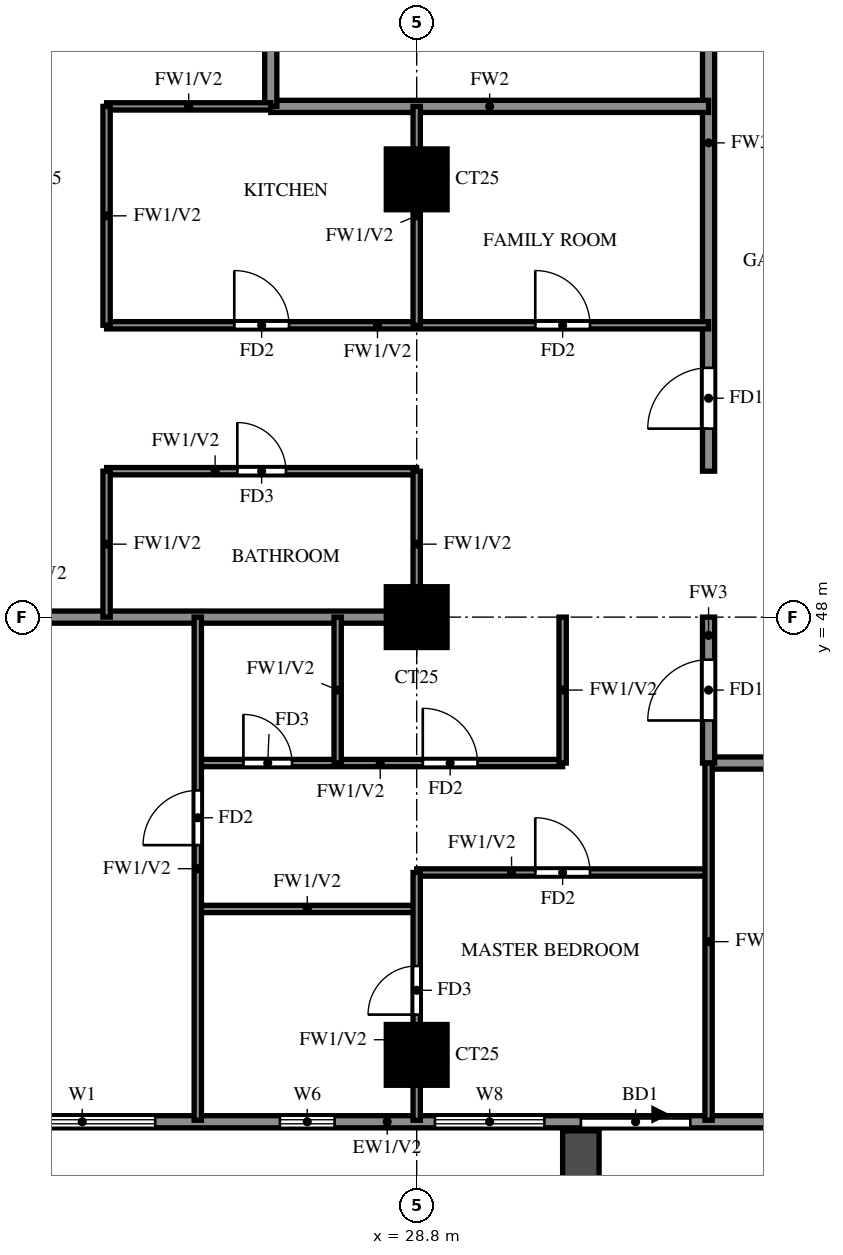
"""IFC4 building model, lengths in metres.
Left out: names, types, materials, properties, quantities, classifications, styles, units other than length and angle.
Written with IfcOpenShell. Run it as: python <this file> out.ifc"""

import sys

from ifc_helpers import new_model, si_unit, direction, frame, frame_2d, origin, origin_2d, place, context, subcontext, project, spatial, rectangle, extrude, source, transform, mapped, element, fill, save


model = new_model("IFC4")
c1 = context("Model", 3, precision=1e-05, world=origin(), true_north=direction((0.0, 1.0)))
c2 = subcontext(c1, "Body", "Model", "MODEL_VIEW")
j1 = project(units=[si_unit("LENGTHUNIT", "METRE"), si_unit("PLANEANGLEUNIT", "RADIAN")], contexts=[c1])
p1 = place(None, origin())
s1 = spatial("IfcSite", under=j1, at=p1, CompositionType="ELEMENT")
p2 = place(p1, origin())
s2 = spatial("IfcBuilding", under=s1, at=p2, CompositionType="ELEMENT")
p3 = place(p2, frame((0.0, 0.0, 153.5)))
s3 = spatial("IfcBuildingStorey", under=s2, at=p3, CompositionType="ELEMENT", Elevation=153.5)
m1 = source(origin(), c2, "Body", "SweptSolid", [
    extrude(rectangle(XDim=1.0, YDim=1.0, at=origin_2d()), origin(), (0.0, 0.0, 1.0), 3.2),
])
for number, where, z_axis, x_axis in (
    (1, (28.8, 40.8, 0.0), (0.0, 0.0, 1.0), (1.0, 0.0, 0.0)),
    (2, (28.8, 48.0, 0.0), (0.0, 0.0, 1.0), (1.0, 0.0, 0.0)),
    (3, (28.8, 55.2, 0.0), (0.0, 0.0, 1.0), (1.0, 0.0, 0.0)),
):
    element("IfcColumn", number, at=place(p3, frame(where, z_axis=z_axis, x_axis=x_axis)), inside=s3, PredefinedType="COLUMN", context=c2, shape_type="MappedRepresentation", body=[
        mapped(m1, transform((0.0, 0.0, 0.0))),
    ])
p4 = place(p3, frame((18.2, 39.7, 0.0), z_axis=(0.0, 0.0, 1.0), x_axis=(1.0, 0.0, 0.0)))
e4 = element("IfcWall", 4, at=p4, inside=s3, PredefinedType="SOLIDWALL", context=c2, shape_type="SweptSolid", body=[
    extrude(rectangle(XDim=23.8, YDim=0.2, at=frame_2d((11.9, 0.0))), origin(), (0.0, 0.0, 1.0), 3.2),
])
p5 = place(p4, frame((13.3, 0.0, 0.0)))
e5 = element("IfcOpeningElement", 5, at=p5, cuts=e4, PredefinedType="OPENING", context=c2, shape_type="SweptSolid", body=[
    extrude(rectangle(XDim=1.8, YDim=2.4, at=frame_2d((0.9, 1.2))), frame((0.0, 0.11, 0.0), z_axis=(0.0, -1.0, 0.0), x_axis=(1.0, 0.0, 0.0)), (0.0, 0.0, 1.0), 0.22),
])
p6 = place(p4, frame((0.9, 0.0, 0.6)))
e6 = element("IfcOpeningElement", 6, at=p6, cuts=e4, PredefinedType="OPENING", context=c2, shape_type="SweptSolid", body=[
    extrude(rectangle(XDim=2.4, YDim=2.4, at=frame_2d((1.2, 1.2))), frame((0.0, 0.11, 0.0), z_axis=(0.0, -1.0, 0.0), x_axis=(1.0, 0.0, 0.0)), (0.0, 0.0, 1.0), 0.22),
])
p7 = place(p4, frame((3.9, 0.0, 0.6)))
e7 = element("IfcOpeningElement", 7, at=p7, cuts=e4, PredefinedType="OPENING", context=c2, shape_type="SweptSolid", body=[
    extrude(rectangle(XDim=2.4, YDim=2.4, at=frame_2d((1.2, 1.2))), frame((0.0, 0.11, 0.0), z_axis=(0.0, -1.0, 0.0), x_axis=(1.0, 0.0, 0.0)), (0.0, 0.0, 1.0), 0.22),
])
p8 = place(p4, frame((10.9, 0.0, 0.6)))
e8 = element("IfcOpeningElement", 8, at=p8, cuts=e4, PredefinedType="OPENING", context=c2, shape_type="SweptSolid", body=[
    extrude(rectangle(XDim=1.8, YDim=2.4, at=frame_2d((0.9, 1.2))), frame((0.0, 0.11, 0.0), z_axis=(0.0, -1.0, 0.0), x_axis=(1.0, 0.0, 0.0)), (0.0, 0.0, 1.0), 0.22),
])
p9 = place(p4, frame((8.35, 0.0, 1.5)))
e9 = element("IfcOpeningElement", 9, at=p9, cuts=e4, PredefinedType="OPENING", context=c2, shape_type="SweptSolid", body=[
    extrude(rectangle(XDim=0.9, YDim=0.9, at=frame_2d((0.45, 0.45))), frame((0.0, 0.11, 0.0), z_axis=(0.0, -1.0, 0.0), x_axis=(1.0, 0.0, 0.0)), (0.0, 0.0, 1.0), 0.22),
])
p10 = place(p3, frame((31.5, 39.55, 0.0), z_axis=(0.0, 0.0, 1.0), x_axis=(0.0, -1.0, 0.0)))
e10 = element("IfcWall", 10, at=p10, inside=s3, PredefinedType="SOLIDWALL", context=c2, shape_type="SweptSolid", body=[
    extrude(rectangle(XDim=2.65, YDim=0.6, at=frame_2d((1.325, 0.0))), origin(), (0.0, 0.0, 1.0), 2.85),
])
p11 = place(p3, frame((33.6, 45.6, 0.0), z_axis=(0.0, 0.0, 1.0), x_axis=(1.0, 0.0, 0.0)))
e11 = element("IfcWall", 11, at=p11, inside=s3, PredefinedType="SOLIDWALL", context=c2, shape_type="SweptSolid", body=[
    extrude(rectangle(XDim=7.2, YDim=0.2, at=frame_2d((3.6, 0.0))), origin(), (0.0, 0.0, 1.0), 3.2),
])
p12 = place(p11, frame((3.15, 0.0, 0.0)))
e12 = element("IfcOpeningElement", 12, at=p12, cuts=e11, PredefinedType="OPENING", context=c2, shape_type="SweptSolid", body=[
    extrude(rectangle(XDim=0.9, YDim=2.1, at=frame_2d((0.45, 1.05))), frame((0.0, 0.11, 0.0), z_axis=(0.0, -1.0, 0.0), x_axis=(1.0, 0.0, 0.0)), (0.0, 0.0, 1.0), 0.22),
])
p13 = place(p3, frame((33.6, 45.6, 0.0), z_axis=(0.0, 0.0, 1.0), x_axis=(0.0, 1.0, 0.0)))
e13 = element("IfcWall", 13, at=p13, inside=s3, PredefinedType="SOLIDWALL", context=c2, shape_type="SweptSolid", body=[
    extrude(rectangle(XDim=2.4, YDim=0.2, at=frame_2d((1.2, 0.0))), origin(), (0.0, 0.0, 1.0), 3.2),
])
p14 = place(p13, frame((0.7, 0.0, 0.0)))
e14 = element("IfcOpeningElement", 14, at=p14, cuts=e13, PredefinedType="OPENING", context=c2, shape_type="SweptSolid", body=[
    extrude(rectangle(XDim=1.0, YDim=2.1, at=frame_2d((0.5, 1.05))), frame((0.0, 0.11, 0.0), z_axis=(0.0, -1.0, 0.0), x_axis=(1.0, 0.0, 0.0)), (0.0, 0.0, 1.0), 0.22),
])
p15 = place(p3, frame((33.6, 50.4, 0.0), z_axis=(0.0, 0.0, 1.0), x_axis=(0.0, 1.0, 0.0)))
e15 = element("IfcWall", 15, at=p15, inside=s3, PredefinedType="SOLIDWALL", context=c2, shape_type="SweptSolid", body=[
    extrude(rectangle(XDim=12.0, YDim=0.2, at=frame_2d((6.0, 0.0))), origin(), (0.0, 0.0, 1.0), 3.2),
])
p16 = place(p15, frame((0.7, 0.0, 0.0)))
e16 = element("IfcOpeningElement", 16, at=p16, cuts=e15, PredefinedType="OPENING", context=c2, shape_type="SweptSolid", body=[
    extrude(rectangle(XDim=1.0, YDim=2.1, at=frame_2d((0.5, 1.05))), frame((0.0, 0.11, 0.0), z_axis=(0.0, -1.0, 0.0), x_axis=(1.0, 0.0, 0.0)), (0.0, 0.0, 1.0), 0.22),
])
p17 = place(p15, frame((9.7, 0.0, 0.0)))
e17 = element("IfcOpeningElement", 17, at=p17, cuts=e15, PredefinedType="OPENING", context=c2, shape_type="SweptSolid", body=[
    extrude(rectangle(XDim=1.0, YDim=2.1, at=frame_2d((0.5, 1.05))), frame((0.0, 0.11, 0.0), z_axis=(0.0, -1.0, 0.0), x_axis=(1.0, 0.0, 0.0)), (0.0, 0.0, 1.0), 0.22),
])
p18 = place(p3, frame((14.525, 48.0, 0.0), z_axis=(0.0, 0.0, 1.0), x_axis=(1.0, 0.0, 0.0)))
e18 = element("IfcWall", 18, at=p18, inside=s3, PredefinedType="SOLIDWALL", context=c2, shape_type="SweptSolid", body=[
    extrude(rectangle(XDim=14.275, YDim=0.2, at=frame_2d((7.138, 0.0))), origin(), (0.0, 0.0, 1.0), 3.2),
])
p19 = place(p3, frame((26.4, 56.4, 0.0), z_axis=(0.0, 0.0, 1.0), x_axis=(1.0, 0.0, 0.0)))
e19 = element("IfcWall", 19, at=p19, inside=s3, PredefinedType="SOLIDWALL", context=c2, shape_type="SweptSolid", body=[
    extrude(rectangle(XDim=7.2, YDim=0.2, at=frame_2d((3.6, 0.0))), origin(), (0.0, 0.0, 1.0), 3.2),
])
p20 = place(p3, frame((26.4, 56.4, 0.0), z_axis=(0.0, 0.0, 1.0), x_axis=(0.0, 1.0, 0.0)))
e20 = element("IfcWall", 20, at=p20, inside=s3, PredefinedType="SOLIDWALL", context=c2, shape_type="SweptSolid", body=[
    extrude(rectangle(XDim=2.4, YDim=0.2, at=frame_2d((1.2, 0.0))), origin(), (0.0, 0.0, 1.0), 3.2),
])
p21 = place(p3, frame((25.2, 43.2, 0.0), z_axis=(0.0, 0.0, 1.0), x_axis=(1.0, 0.0, 0.0)))
e21 = element("IfcWall", 21, at=p21, inside=s3, PredefinedType="PARTITIONING", context=c2, shape_type="SweptSolid", body=[
    extrude(rectangle(XDim=3.6, YDim=0.12, at=frame_2d((1.8, 0.0))), origin(), (0.0, 0.0, 1.0), 3.2),
])
p22 = place(p3, frame((28.8, 43.8, 0.0), z_axis=(0.0, 0.0, 1.0), x_axis=(1.0, 0.0, 0.0)))
e22 = element("IfcWall", 22, at=p22, inside=s3, PredefinedType="PARTITIONING", context=c2, shape_type="SweptSolid", body=[
    extrude(rectangle(XDim=4.8, YDim=0.12, at=frame_2d((2.4, 0.0))), origin(), (0.0, 0.0, 1.0), 3.2),
])
p23 = place(p22, frame((1.95, 0.0, 0.0)))
e23 = element("IfcOpeningElement", 23, at=p23, cuts=e22, PredefinedType="OPENING", context=c2, shape_type="SweptSolid", body=[
    extrude(rectangle(XDim=0.9, YDim=2.1, at=frame_2d((0.45, 1.05))), frame((0.0, 0.07, 0.0), z_axis=(0.0, -1.0, 0.0), x_axis=(1.0, 0.0, 0.0)), (0.0, 0.0, 1.0), 0.14),
])
p24 = place(p3, frame((25.2, 45.6, 0.0), z_axis=(0.0, 0.0, 1.0), x_axis=(1.0, 0.0, 0.0)))
e24 = element("IfcWall", 24, at=p24, inside=s3, PredefinedType="PARTITIONING", context=c2, shape_type="SweptSolid", body=[
    extrude(rectangle(XDim=6.0, YDim=0.12, at=frame_2d((3.0, 0.0))), origin(), (0.0, 0.0, 1.0), 3.2),
])
p25 = place(p24, frame((0.75, 0.0, 0.0)))
e25 = element("IfcOpeningElement", 25, at=p25, cuts=e24, PredefinedType="OPENING", context=c2, shape_type="SweptSolid", body=[
    extrude(rectangle(XDim=0.8, YDim=2.1, at=frame_2d((0.4, 1.05))), frame((0.0, 0.07, 0.0), z_axis=(0.0, -1.0, 0.0), x_axis=(1.0, 0.0, 0.0)), (0.0, 0.0, 1.0), 0.14),
])
p26 = place(p24, frame((3.7, 0.0, 0.0)))
e26 = element("IfcOpeningElement", 26, at=p26, cuts=e24, PredefinedType="OPENING", context=c2, shape_type="SweptSolid", body=[
    extrude(rectangle(XDim=0.9, YDim=2.1, at=frame_2d((0.45, 1.05))), frame((0.0, 0.07, 0.0), z_axis=(0.0, -1.0, 0.0), x_axis=(1.0, 0.0, 0.0)), (0.0, 0.0, 1.0), 0.14),
])
p27 = place(p3, frame((23.7, 50.4, 0.0), z_axis=(0.0, 0.0, 1.0), x_axis=(1.0, 0.0, 0.0)))
e27 = element("IfcWall", 27, at=p27, inside=s3, PredefinedType="PARTITIONING", context=c2, shape_type="SweptSolid", body=[
    extrude(rectangle(XDim=5.1, YDim=0.12, at=frame_2d((2.55, 0.0))), origin(), (0.0, 0.0, 1.0), 3.2),
])
p28 = place(p27, frame((2.15, 0.0, 0.0)))
e28 = element("IfcOpeningElement", 28, at=p28, cuts=e27, PredefinedType="OPENING", context=c2, shape_type="SweptSolid", body=[
    extrude(rectangle(XDim=0.8, YDim=2.1, at=frame_2d((0.4, 1.05))), frame((0.0, 0.07, 0.0), z_axis=(0.0, -1.0, 0.0), x_axis=(1.0, 0.0, 0.0)), (0.0, 0.0, 1.0), 0.14),
])
p29 = place(p3, frame((23.7, 52.8, 0.0), z_axis=(0.0, 0.0, 1.0), x_axis=(1.0, 0.0, 0.0)))
e29 = element("IfcWall", 29, at=p29, inside=s3, PredefinedType="PARTITIONING", context=c2, shape_type="SweptSolid", body=[
    extrude(rectangle(XDim=9.9, YDim=0.12, at=frame_2d((4.95, 0.0))), origin(), (0.0, 0.0, 1.0), 3.2),
])
p30 = place(p29, frame((2.1, 0.0, 0.0)))
e30 = element("IfcOpeningElement", 30, at=p30, cuts=e29, PredefinedType="OPENING", context=c2, shape_type="SweptSolid", body=[
    extrude(rectangle(XDim=0.9, YDim=2.1, at=frame_2d((0.45, 1.05))), frame((0.0, 0.07, 0.0), z_axis=(0.0, -1.0, 0.0), x_axis=(1.0, 0.0, 0.0)), (0.0, 0.0, 1.0), 0.14),
])
p31 = place(p29, frame((7.05, 0.0, 0.0)))
e31 = element("IfcOpeningElement", 31, at=p31, cuts=e29, PredefinedType="OPENING", context=c2, shape_type="SweptSolid", body=[
    extrude(rectangle(XDim=0.9, YDim=2.1, at=frame_2d((0.45, 1.05))), frame((0.0, 0.07, 0.0), z_axis=(0.0, -1.0, 0.0), x_axis=(1.0, 0.0, 0.0)), (0.0, 0.0, 1.0), 0.14),
])
p32 = place(p3, frame((23.7, 56.4, 0.0), z_axis=(0.0, 0.0, 1.0), x_axis=(1.0, 0.0, 0.0)))
e32 = element("IfcWall", 32, at=p32, inside=s3, PredefinedType="PARTITIONING", context=c2, shape_type="SweptSolid", body=[
    extrude(rectangle(XDim=2.7, YDim=0.12, at=frame_2d((1.35, 0.0))), origin(), (0.0, 0.0, 1.0), 3.2),
])
p33 = place(p3, frame((23.7, 48.0, 0.0), z_axis=(0.0, 0.0, 1.0), x_axis=(0.0, 1.0, 0.0)))
e33 = element("IfcWall", 33, at=p33, inside=s3, PredefinedType="PARTITIONING", context=c2, shape_type="SweptSolid", body=[
    extrude(rectangle(XDim=2.4, YDim=0.12, at=frame_2d((1.2, 0.0))), origin(), (0.0, 0.0, 1.0), 3.2),
])
p34 = place(p3, frame((23.7, 52.8, 0.0), z_axis=(0.0, 0.0, 1.0), x_axis=(0.0, 1.0, 0.0)))
e34 = element("IfcWall", 34, at=p34, inside=s3, PredefinedType="PARTITIONING", context=c2, shape_type="SweptSolid", body=[
    extrude(rectangle(XDim=3.6, YDim=0.12, at=frame_2d((1.8, 0.0))), origin(), (0.0, 0.0, 1.0), 3.2),
])
p35 = place(p3, frame((25.2, 39.725, 0.0), z_axis=(0.0, 0.0, 1.0), x_axis=(0.0, 1.0, 0.0)))
e35 = element("IfcWall", 35, at=p35, inside=s3, PredefinedType="PARTITIONING", context=c2, shape_type="SweptSolid", body=[
    extrude(rectangle(XDim=8.275, YDim=0.12, at=frame_2d((4.137, 0.0))), origin(), (0.0, 0.0, 1.0), 3.2),
])
p36 = place(p35, frame((4.525, 0.0, 0.0)))
e36 = element("IfcOpeningElement", 36, at=p36, cuts=e35, PredefinedType="OPENING", context=c2, shape_type="SweptSolid", body=[
    extrude(rectangle(XDim=0.9, YDim=2.1, at=frame_2d((0.45, 1.05))), frame((0.0, 0.07, 0.0), z_axis=(0.0, -1.0, 0.0), x_axis=(1.0, 0.0, 0.0)), (0.0, 0.0, 1.0), 0.14),
])
p37 = place(p3, frame((27.5, 45.6, 0.0), z_axis=(0.0, 0.0, 1.0), x_axis=(0.0, 1.0, 0.0)))
e37 = element("IfcWall", 37, at=p37, inside=s3, PredefinedType="PARTITIONING", context=c2, shape_type="SweptSolid", body=[
    extrude(rectangle(XDim=2.4, YDim=0.12, at=frame_2d((1.2, 0.0))), origin(), (0.0, 0.0, 1.0), 3.2),
])
p38 = place(p3, frame((28.8, 39.725, 0.0), z_axis=(0.0, 0.0, 1.0), x_axis=(0.0, 1.0, 0.0)))
e38 = element("IfcWall", 38, at=p38, inside=s3, PredefinedType="PARTITIONING", context=c2, shape_type="SweptSolid", body=[
    extrude(rectangle(XDim=4.075, YDim=0.12, at=frame_2d((2.038, 0.0))), origin(), (0.0, 0.0, 1.0), 3.2),
])
p39 = place(p38, frame((1.738, 0.0, 0.0)))
e39 = element("IfcOpeningElement", 39, at=p39, cuts=e38, PredefinedType="OPENING", context=c2, shape_type="SweptSolid", body=[
    extrude(rectangle(XDim=0.8, YDim=2.1, at=frame_2d((0.4, 1.05))), frame((0.0, 0.07, 0.0), z_axis=(0.0, -1.0, 0.0), x_axis=(1.0, 0.0, 0.0)), (0.0, 0.0, 1.0), 0.14),
])
p40 = place(p3, frame((28.8, 48.0, 0.0), z_axis=(0.0, 0.0, 1.0), x_axis=(0.0, 1.0, 0.0)))
e40 = element("IfcWall", 40, at=p40, inside=s3, PredefinedType="PARTITIONING", context=c2, shape_type="SweptSolid", body=[
    extrude(rectangle(XDim=2.4, YDim=0.12, at=frame_2d((1.2, 0.0))), origin(), (0.0, 0.0, 1.0), 3.2),
])
p41 = place(p3, frame((28.8, 52.8, 0.0), z_axis=(0.0, 0.0, 1.0), x_axis=(0.0, 1.0, 0.0)))
e41 = element("IfcWall", 41, at=p41, inside=s3, PredefinedType="PARTITIONING", context=c2, shape_type="SweptSolid", body=[
    extrude(rectangle(XDim=3.6, YDim=0.12, at=frame_2d((1.8, 0.0))), origin(), (0.0, 0.0, 1.0), 3.2),
])
p42 = place(p3, frame((31.2, 45.6, 0.0), z_axis=(0.0, 0.0, 1.0), x_axis=(0.0, 1.0, 0.0)))
e42 = element("IfcWall", 42, at=p42, inside=s3, PredefinedType="PARTITIONING", context=c2, shape_type="SweptSolid", body=[
    extrude(rectangle(XDim=2.4, YDim=0.12, at=frame_2d((1.2, 0.0))), origin(), (0.0, 0.0, 1.0), 3.2),
])
p43 = place(p3, frame((33.6, 39.725, 0.0), z_axis=(0.0, 0.0, 1.0), x_axis=(0.0, 1.0, 0.0)))
e43 = element("IfcWall", 43, at=p43, inside=s3, PredefinedType="PARTITIONING", context=c2, shape_type="SweptSolid", body=[
    extrude(rectangle(XDim=5.875, YDim=0.12, at=frame_2d((2.938, 0.0))), origin(), (0.0, 0.0, 1.0), 3.2),
])
p44 = place(p5, origin())
e44 = element("IfcDoor", 44, at=p44, inside=s3, OperationType="DOUBLE_DOOR_SLIDING", PredefinedType="DOOR", context=c2, shape_type="SweptSolid", body=[
    extrude(rectangle(XDim=1.8, YDim=2.4, at=frame_2d((0.9, 1.2))), frame((0.0, 0.025, 0.0), z_axis=(0.0, -1.0, 0.0), x_axis=(1.0, 0.0, 0.0)), (0.0, 0.0, 1.0), 0.05),
])
fill(e5, e44)
p45 = place(p7, origin())
e45 = element("IfcWindow", 45, at=p45, inside=s3, PartitioningType="DOUBLE_PANEL_VERTICAL", PredefinedType="WINDOW", context=c2, shape_type="SweptSolid", body=[
    extrude(rectangle(XDim=2.4, YDim=2.4, at=frame_2d((1.2, 1.2))), frame((0.0, 0.03, 0.0), z_axis=(0.0, -1.0, 0.0), x_axis=(1.0, 0.0, 0.0)), (0.0, 0.0, 1.0), 0.06),
])
fill(e7, e45)
p46 = place(p8, origin())
e46 = element("IfcWindow", 46, at=p46, inside=s3, PartitioningType="DOUBLE_PANEL_VERTICAL", PredefinedType="WINDOW", context=c2, shape_type="SweptSolid", body=[
    extrude(rectangle(XDim=1.8, YDim=2.4, at=frame_2d((0.9, 1.2))), frame((0.0, 0.03, 0.0), z_axis=(0.0, -1.0, 0.0), x_axis=(1.0, 0.0, 0.0)), (0.0, 0.0, 1.0), 0.06),
])
fill(e8, e46)
p47 = place(p9, origin())
e47 = element("IfcWindow", 47, at=p47, inside=s3, PartitioningType="SINGLE_PANEL", PredefinedType="WINDOW", context=c2, shape_type="SweptSolid", body=[
    extrude(rectangle(XDim=0.9, YDim=0.9, at=frame_2d((0.45, 0.45))), frame((0.0, 0.03, 0.0), z_axis=(0.0, -1.0, 0.0), x_axis=(1.0, 0.0, 0.0)), (0.0, 0.0, 1.0), 0.06),
])
fill(e9, e47)
p48 = place(p14, origin())
e48 = element("IfcDoor", 48, at=p48, inside=s3, OperationType="SINGLE_SWING_LEFT", PredefinedType="DOOR", context=c2, shape_type="SweptSolid", body=[
    extrude(rectangle(XDim=1.0, YDim=2.1, at=frame_2d((0.5, 1.05))), frame((0.0, 0.025, 0.0), z_axis=(0.0, -1.0, 0.0), x_axis=(1.0, 0.0, 0.0)), (0.0, 0.0, 1.0), 0.05),
])
fill(e14, e48)
p49 = place(p36, origin())
e49 = element("IfcDoor", 49, at=p49, inside=s3, OperationType="SINGLE_SWING_LEFT", PredefinedType="DOOR", context=c2, shape_type="SweptSolid", body=[
    extrude(rectangle(XDim=0.9, YDim=2.1, at=frame_2d((0.45, 1.05))), frame((0.0, 0.025, 0.0), z_axis=(0.0, -1.0, 0.0), x_axis=(1.0, 0.0, 0.0)), (0.0, 0.0, 1.0), 0.05),
])
fill(e36, e49)
p50 = place(p23, origin())
e50 = element("IfcDoor", 50, at=p50, inside=s3, OperationType="SINGLE_SWING_RIGHT", PredefinedType="DOOR", context=c2, shape_type="SweptSolid", body=[
    extrude(rectangle(XDim=0.9, YDim=2.1, at=frame_2d((0.45, 1.05))), frame((0.0, 0.025, 0.0), z_axis=(0.0, -1.0, 0.0), x_axis=(1.0, 0.0, 0.0)), (0.0, 0.0, 1.0), 0.05),
])
fill(e23, e50)
p51 = place(p39, origin())
e51 = element("IfcDoor", 51, at=p51, inside=s3, OperationType="SINGLE_SWING_RIGHT", PredefinedType="DOOR", context=c2, shape_type="SweptSolid", body=[
    extrude(rectangle(XDim=0.8, YDim=2.1, at=frame_2d((0.4, 1.05))), frame((0.0, 0.025, 0.0), z_axis=(0.0, -1.0, 0.0), x_axis=(1.0, 0.0, 0.0)), (0.0, 0.0, 1.0), 0.05),
])
fill(e39, e51)
p52 = place(p25, origin())
e52 = element("IfcDoor", 52, at=p52, inside=s3, OperationType="SINGLE_SWING_LEFT", PredefinedType="DOOR", context=c2, shape_type="SweptSolid", body=[
    extrude(rectangle(XDim=0.8, YDim=2.1, at=frame_2d((0.4, 1.05))), frame((0.0, 0.025, 0.0), z_axis=(0.0, -1.0, 0.0), x_axis=(1.0, 0.0, 0.0)), (0.0, 0.0, 1.0), 0.05),
])
fill(e25, e52)
p53 = place(p26, origin())
e53 = element("IfcDoor", 53, at=p53, inside=s3, OperationType="SINGLE_SWING_RIGHT", PredefinedType="DOOR", context=c2, shape_type="SweptSolid", body=[
    extrude(rectangle(XDim=0.9, YDim=2.1, at=frame_2d((0.45, 1.05))), frame((0.0, 0.025, 0.0), z_axis=(0.0, -1.0, 0.0), x_axis=(1.0, 0.0, 0.0)), (0.0, 0.0, 1.0), 0.05),
])
fill(e26, e53)
p54 = place(p16, origin())
e54 = element("IfcDoor", 54, at=p54, inside=s3, OperationType="SINGLE_SWING_LEFT", PredefinedType="DOOR", context=c2, shape_type="SweptSolid", body=[
    extrude(rectangle(XDim=1.0, YDim=2.1, at=frame_2d((0.5, 1.05))), frame((0.0, 0.025, 0.0), z_axis=(0.0, -1.0, 0.0), x_axis=(1.0, 0.0, 0.0)), (0.0, 0.0, 1.0), 0.05),
])
fill(e16, e54)
p55 = place(p28, origin())
e55 = element("IfcDoor", 55, at=p55, inside=s3, OperationType="SINGLE_SWING_LEFT", PredefinedType="DOOR", context=c2, shape_type="SweptSolid", body=[
    extrude(rectangle(XDim=0.8, YDim=2.1, at=frame_2d((0.4, 1.05))), frame((0.0, 0.025, 0.0), z_axis=(0.0, -1.0, 0.0), x_axis=(1.0, 0.0, 0.0)), (0.0, 0.0, 1.0), 0.05),
])
fill(e28, e55)
p56 = place(p30, origin())
e56 = element("IfcDoor", 56, at=p56, inside=s3, OperationType="SINGLE_SWING_RIGHT", PredefinedType="DOOR", context=c2, shape_type="SweptSolid", body=[
    extrude(rectangle(XDim=0.9, YDim=2.1, at=frame_2d((0.45, 1.05))), frame((0.0, 0.025, 0.0), z_axis=(0.0, -1.0, 0.0), x_axis=(1.0, 0.0, 0.0)), (0.0, 0.0, 1.0), 0.05),
])
fill(e30, e56)
p57 = place(p31, origin())
e57 = element("IfcDoor", 57, at=p57, inside=s3, OperationType="SINGLE_SWING_LEFT", PredefinedType="DOOR", context=c2, shape_type="SweptSolid", body=[
    extrude(rectangle(XDim=0.9, YDim=2.1, at=frame_2d((0.45, 1.05))), frame((0.0, 0.025, 0.0), z_axis=(0.0, -1.0, 0.0), x_axis=(1.0, 0.0, 0.0)), (0.0, 0.0, 1.0), 0.05),
])
fill(e31, e57)
save(model, sys.argv[1])
